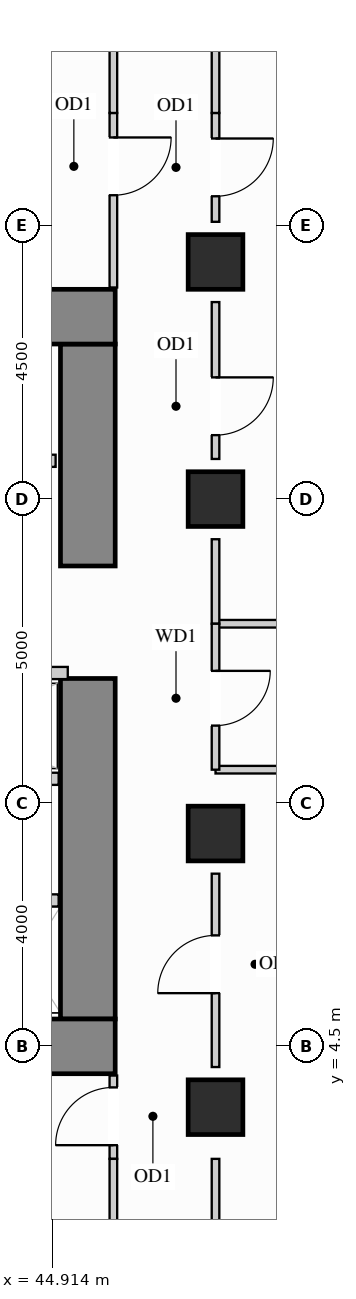
"""IFC4 building model, lengths in metres.
Left out: names, types, materials, properties, quantities, classifications, styles, units other than length and angle.
Written with IfcOpenShell. Run it as: python <this file> out.ifc"""

import sys

from ifc_helpers import new_model, si_unit, direction, frame, frame_2d, origin, origin_2d, place, context, subcontext, project, spatial, rectangle, extrude, source, transform, mapped, element, fill, save


model = new_model("IFC4")
c1 = context("Model", 3, precision=1e-05, world=origin(), true_north=direction((0.0, 1.0)))
c2 = subcontext(c1, "Body", "Model", "MODEL_VIEW")
j1 = project(units=[si_unit("LENGTHUNIT", "METRE"), si_unit("PLANEANGLEUNIT", "RADIAN")], contexts=[c1])
p1 = place(None, origin())
s1 = spatial("IfcSite", under=j1, at=p1, CompositionType="ELEMENT")
p2 = place(p1, origin())
s2 = spatial("IfcBuilding", under=s1, at=p2, CompositionType="ELEMENT")
p3 = place(p2, frame((0.0, 0.0, 69.3)))
s3 = spatial("IfcBuildingStorey", under=s2, at=p3, CompositionType="ELEMENT", Elevation=69.3)
m1 = source(origin(), c2, "Body", "SweptSolid", [
    extrude(rectangle(XDim=0.9, YDim=0.9, at=origin_2d()), origin(), (0.0, 0.0, 1.0), 3.32),
])
for number, where, z_axis, x_axis in (
    (1, (47.6, 13.5, 0.0), (0.0, 0.0, 1.0), (1.0, 0.0, 0.0)),
    (2, (47.6, 3.5, 0.0), (0.0, 0.0, 1.0), (1.0, 0.0, 0.0)),
    (3, (47.6, 8.0, 0.0), (0.0, 0.0, 1.0), (1.0, 0.0, 0.0)),
    (4, (47.6, 17.4, 0.0), (0.0, 0.0, 1.0), (1.0, 0.0, 0.0)),
):
    element("IfcColumn", number, at=place(p3, frame(where, z_axis=z_axis, x_axis=x_axis)), inside=s3, PredefinedType="COLUMN", context=c2, shape_type="MappedRepresentation", body=[
        mapped(m1, transform((0.0, 0.0, 0.0), x_axis=(1.0, 0.0, 0.0), y_axis=(0.0, 1.0, 0.0), z_axis=(0.0, 0.0, 1.0))),
    ])
m2 = source(origin(), c2, "Body", "SweptSolid", [
    extrude(rectangle(XDim=5.6, YDim=0.9, at=frame_2d((2.8, 0.0))), origin(), (0.0, 0.0, 1.0), 3.32),
])
p4 = place(p3, frame((45.5, 4.95, 0.0), z_axis=(0.0, 0.0, 1.0), x_axis=(0.0, 1.0, 0.0)))
e5 = element("IfcWall", 5, at=p4, inside=s3, PredefinedType="SHEAR", context=c2, shape_type="MappedRepresentation", body=[
    mapped(m2, transform((0.0, 0.0, 0.0), x_axis=(1.0, 0.0, 0.0), y_axis=(0.0, 1.0, 0.0), z_axis=(0.0, 0.0, 1.0))),
])
m3 = source(origin(), c2, "Body", "SweptSolid", [
    extrude(rectangle(XDim=3.65, YDim=0.9, at=frame_2d((1.825, 0.0))), origin(), (0.0, 0.0, 1.0), 3.32),
])
p5 = place(p3, frame((45.5, 12.4, 0.0), z_axis=(0.0, 0.0, 1.0), x_axis=(0.0, 1.0, 0.0)))
e6 = element("IfcWall", 6, at=p5, inside=s3, PredefinedType="SHEAR", context=c2, shape_type="MappedRepresentation", body=[
    mapped(m3, transform((0.0, 0.0, 0.0), x_axis=(1.0, 0.0, 0.0), y_axis=(0.0, 1.0, 0.0), z_axis=(0.0, 0.0, 1.0))),
])
m4 = source(origin(), c2, "Body", "SweptSolid", [
    extrude(rectangle(XDim=10.4, YDim=0.9, at=frame_2d((5.2, 0.0))), origin(), (0.0, 0.0, 1.0), 3.32),
])
for number, where, z_axis, x_axis in (
    (7, (35.55, 16.5, 0.0), (0.0, 0.0, 1.0), (1.0, 0.0, 0.0)),
    (8, (35.55, 4.5, 0.0), (0.0, 0.0, 1.0), (1.0, 0.0, 0.0)),
):
    element("IfcWall", number, at=place(p3, frame(where, z_axis=z_axis, x_axis=x_axis)), inside=s3, PredefinedType="SHEAR", context=c2, shape_type="MappedRepresentation", body=[
        mapped(m4, transform((0.0, 0.0, 0.0), x_axis=(1.0, 0.0, 0.0), y_axis=(0.0, 1.0, 0.0), z_axis=(0.0, 0.0, 1.0))),
    ])
m5 = source(origin(), c2, "Body", "SweptSolid", [
    extrude(rectangle(XDim=11.048, YDim=0.125, at=frame_2d((5.524, 0.0))), origin(), (0.0, 0.0, 1.0), 3.305),
])
for number, where, z_axis, x_axis in (
    (9, (47.6, 11.45, 0.0), (0.0, 0.0, 1.0), (1.0, 0.0, 0.0)),
    (10, (47.6, 9.05, 0.0), (0.0, 0.0, 1.0), (1.0, 0.0, 0.0)),
):
    element("IfcWall", number, at=place(p3, frame(where, z_axis=z_axis, x_axis=x_axis)), inside=s3, PredefinedType="PARTITIONING", context=c2, shape_type="MappedRepresentation", body=[
        mapped(m5, transform((0.0, 0.0, 0.0), x_axis=(1.0, 0.0, 0.0), y_axis=(0.0, 1.0, 0.0), z_axis=(0.0, 0.0, 1.0))),
    ])
p6 = place(p3, frame((47.6, 4.16, 0.0), z_axis=(0.0, 0.0, 1.0), x_axis=(0.0, 1.0, 0.0)))
e11 = element("IfcWall", 11, at=p6, inside=s3, PredefinedType="PARTITIONING", context=c2, shape_type="SweptSolid", body=[
    extrude(rectangle(XDim=3.18, YDim=0.125, at=frame_2d((1.59, 0.0))), origin(), (0.0, 0.0, 1.0), 2.61),
])
p7 = place(p6, frame((1.215, 0.0, 0.0)))
e12 = element("IfcOpeningElement", 12, at=p7, cuts=e11, PredefinedType="OPENING", context=c2, shape_type="SweptSolid", body=[
    extrude(rectangle(XDim=0.95, YDim=2.15, at=frame_2d((0.475, 1.075))), frame((0.0, 0.073, 0.0), z_axis=(0.0, -1.0, 0.0), x_axis=(1.0, 0.0, 0.0)), (0.0, 0.0, 1.0), 0.145),
])
m6 = source(origin(), c2, "Body", "SweptSolid", [
    extrude(rectangle(XDim=1.39, YDim=0.125, at=frame_2d((0.695, 0.0))), origin(), (0.0, 0.0, 1.0), 2.61),
])
p8 = place(p3, frame((47.6, 1.26, 0.0), z_axis=(0.0, 0.0, 1.0), x_axis=(0.0, 1.0, 0.0)))
e13 = element("IfcWall", 13, at=p8, inside=s3, PredefinedType="PARTITIONING", context=c2, shape_type="MappedRepresentation", body=[
    mapped(m6, transform((0.0, 0.0, 0.0), x_axis=(1.0, 0.0, 0.0), y_axis=(0.0, 1.0, 0.0), z_axis=(0.0, 0.0, 1.0))),
])
m7 = source(origin(), c2, "Body", "SweptSolid", [
    extrude(rectangle(XDim=1.39, YDim=0.125, at=frame_2d((0.695, 0.0))), origin(), (0.0, 0.0, 1.0), 2.61),
])
p9 = place(p3, frame((47.6, 11.45, 0.0), z_axis=(0.0, 0.0, 1.0), x_axis=(0.0, 1.0, 0.0)))
e14 = element("IfcWall", 14, at=p9, inside=s3, PredefinedType="PARTITIONING", context=c2, shape_type="MappedRepresentation", body=[
    mapped(m7, transform((0.0, 0.0, 0.0), x_axis=(1.0, 0.0, 0.0), y_axis=(0.0, 1.0, 0.0), z_axis=(0.0, 0.0, 1.0))),
])
p10 = place(p3, frame((47.6, 14.16, 0.0), z_axis=(0.0, 0.0, 1.0), x_axis=(0.0, 1.0, 0.0)))
e15 = element("IfcWall", 15, at=p10, inside=s3, PredefinedType="PARTITIONING", context=c2, shape_type="SweptSolid", body=[
    extrude(rectangle(XDim=2.58, YDim=0.125, at=frame_2d((1.29, 0.0))), origin(), (0.0, 0.0, 1.0), 2.61),
])
p11 = place(p10, frame((0.392, 0.0, 0.0)))
e16 = element("IfcOpeningElement", 16, at=p11, cuts=e15, PredefinedType="OPENING", context=c2, shape_type="SweptSolid", body=[
    extrude(rectangle(XDim=0.95, YDim=2.15, at=frame_2d((0.475, 1.075))), frame((0.0, 0.073, 0.0), z_axis=(0.0, -1.0, 0.0), x_axis=(1.0, 0.0, 0.0)), (0.0, 0.0, 1.0), 0.145),
])
p12 = place(p3, frame((47.6, 18.06, 0.0), z_axis=(0.0, 0.0, 1.0), x_axis=(0.0, 1.0, 0.0)))
e17 = element("IfcWall", 17, at=p12, inside=s3, PredefinedType="PARTITIONING", context=c2, shape_type="SweptSolid", body=[
    extrude(rectangle(XDim=1.79, YDim=0.125, at=frame_2d((0.895, 0.0))), origin(), (0.0, 0.0, 1.0), 2.61),
])
p13 = place(p12, frame((0.42, 0.0, 0.0)))
e18 = element("IfcOpeningElement", 18, at=p13, cuts=e17, PredefinedType="OPENING", context=c2, shape_type="SweptSolid", body=[
    extrude(rectangle(XDim=0.95, YDim=2.15, at=frame_2d((0.475, 1.075))), frame((0.0, 0.073, 0.0), z_axis=(0.0, -1.0, 0.0), x_axis=(1.0, 0.0, 0.0)), (0.0, 0.0, 1.0), 0.145),
])
p14 = place(p3, frame((47.6, 19.85, 0.0), z_axis=(0.0, 0.0, 1.0), x_axis=(0.0, 1.0, 0.0)))
e19 = element("IfcWall", 19, at=p14, inside=s3, PredefinedType="PARTITIONING", context=c2, shape_type="MappedRepresentation", body=[
    mapped(m6, transform((0.0, 0.0, 0.0), x_axis=(1.0, 0.0, 0.0), y_axis=(0.0, 1.0, 0.0), z_axis=(0.0, 0.0, 1.0))),
])
p15 = place(p3, frame((47.6, 9.05, 0.0), z_axis=(0.0, 0.0, 1.0), x_axis=(0.0, 1.0, 0.0)))
e20 = element("IfcWall", 20, at=p15, inside=s3, PredefinedType="PARTITIONING", context=c2, shape_type="SweptSolid", body=[
    extrude(rectangle(XDim=2.4, YDim=0.125, at=frame_2d((1.2, 0.0))), origin(), (0.0, 0.0, 1.0), 2.61),
])
p16 = place(p15, frame((0.725, 0.0, 0.0)))
e21 = element("IfcOpeningElement", 21, at=p16, cuts=e20, PredefinedType="OPENING", context=c2, shape_type="SweptSolid", body=[
    extrude(rectangle(XDim=0.9, YDim=2.15, at=frame_2d((0.45, 1.075))), frame((0.0, 0.073, 0.0), z_axis=(0.0, -1.0, 0.0), x_axis=(1.0, 0.0, 0.0)), (0.0, 0.0, 1.0), 0.145),
])
p17 = place(p3, frame((45.92, 16.98, 0.0), z_axis=(0.0, 0.0, 1.0), x_axis=(0.0, 1.0, 0.0)))
e22 = element("IfcWall", 22, at=p17, inside=s3, PredefinedType="PARTITIONING", context=c2, shape_type="SweptSolid", body=[
    extrude(rectangle(XDim=2.87, YDim=0.125, at=frame_2d((1.435, 0.0))), origin(), (0.0, 0.0, 1.0), 3.305),
])
p18 = place(p17, frame((1.517, 0.0, 0.0)))
e23 = element("IfcOpeningElement", 23, at=p18, cuts=e22, PredefinedType="OPENING", context=c2, shape_type="SweptSolid", body=[
    extrude(rectangle(XDim=0.95, YDim=2.15, at=frame_2d((0.475, 1.075))), frame((0.0, 0.073, 0.0), z_axis=(0.0, -1.0, 0.0), x_axis=(1.0, 0.0, 0.0)), (0.0, 0.0, 1.0), 0.145),
])
m8 = source(origin(), c2, "Body", "SweptSolid", [
    extrude(rectangle(XDim=2.298, YDim=0.125, at=frame_2d((1.149, 0.0))), origin(), (0.0, 0.0, 1.0), 3.305),
])
p19 = place(p3, frame((45.92, 19.85, 0.0), z_axis=(0.0, 0.0, 1.0), x_axis=(0.0, 1.0, 0.0)))
e24 = element("IfcWall", 24, at=p19, inside=s3, PredefinedType="PARTITIONING", context=c2, shape_type="MappedRepresentation", body=[
    mapped(m8, transform((0.0, 0.0, 0.0), x_axis=(1.0, 0.0, 0.0), y_axis=(0.0, 1.0, 0.0), z_axis=(0.0, 0.0, 1.0))),
])
p20 = place(p3, frame((45.92, 2.65, 0.0), z_axis=(0.0, 0.0, 1.0), x_axis=(0.0, 1.0, 0.0)))
e25 = element("IfcWall", 25, at=p20, inside=s3, PredefinedType="PARTITIONING", context=c2, shape_type="SweptSolid", body=[
    extrude(rectangle(XDim=1.37, YDim=0.125, at=frame_2d((0.685, 0.0))), origin(), (0.0, 0.0, 1.0), 3.305),
])
p21 = place(p20, frame((0.225, 0.0, 0.0)))
e26 = element("IfcOpeningElement", 26, at=p21, cuts=e25, PredefinedType="OPENING", context=c2, shape_type="SweptSolid", body=[
    extrude(rectangle(XDim=0.95, YDim=2.15, at=frame_2d((0.475, 1.075))), frame((0.0, 0.073, 0.0), z_axis=(0.0, -1.0, 0.0), x_axis=(1.0, 0.0, 0.0)), (0.0, 0.0, 1.0), 0.145),
])
p22 = place(p3, frame((45.92, 0.352, 0.0), z_axis=(0.0, 0.0, 1.0), x_axis=(0.0, 1.0, 0.0)))
e27 = element("IfcWall", 27, at=p22, inside=s3, PredefinedType="PARTITIONING", context=c2, shape_type="MappedRepresentation", body=[
    mapped(m8, transform((0.0, 0.0, 0.0), x_axis=(1.0, 0.0, 0.0), y_axis=(0.0, 1.0, 0.0), z_axis=(0.0, 0.0, 1.0))),
])
m9 = source(origin(), c2, "Body", "SweptSolid", [
    extrude(rectangle(XDim=1.17, YDim=0.2, at=frame_2d((0.585, 0.0))), origin(), (0.0, 0.0, 1.0), 3.305),
])
p23 = place(p3, frame((43.85, 6.9, 0.0), z_axis=(0.0, 0.0, 1.0), x_axis=(1.0, 0.0, 0.0)))
e28 = element("IfcWall", 28, at=p23, inside=s3, PredefinedType="PARTITIONING", context=c2, shape_type="MappedRepresentation", body=[
    mapped(m9, transform((0.0, 0.0, 0.0), x_axis=(1.0, 0.0, 0.0), y_axis=(0.0, 1.0, 0.0), z_axis=(0.0, 0.0, 1.0))),
])
p24 = place(p3, frame((42.23, 14.13, 0.0), z_axis=(0.0, 0.0, 1.0), x_axis=(1.0, 0.0, 0.0)))
e29 = element("IfcWall", 29, at=p24, inside=s3, PredefinedType="PARTITIONING", context=c2, shape_type="SweptSolid", body=[
    extrude(rectangle(XDim=2.74, YDim=0.2, at=frame_2d((1.37, 0.0))), origin(), (0.0, 0.0, 1.0), 3.305),
])
p25 = place(p24, frame((0.82, 0.0, 0.0)))
e30 = element("IfcOpeningElement", 30, at=p25, cuts=e29, PredefinedType="OPENING", context=c2, shape_type="SweptSolid", body=[
    extrude(rectangle(XDim=1.1, YDim=2.2, at=frame_2d((0.55, 1.1))), frame((0.0, 0.11, 0.0), z_axis=(0.0, -1.0, 0.0), x_axis=(1.0, 0.0, 0.0)), (0.0, 0.0, 1.0), 0.22),
])
m10 = source(origin(), c2, "Body", "SweptSolid", [
    extrude(rectangle(XDim=3.49, YDim=0.2, at=frame_2d((1.745, 0.0))), origin(), (0.0, 0.0, 1.0), 3.305),
])
p26 = place(p3, frame((41.68, 10.64, 0.0), z_axis=(0.0, 0.0, 1.0), x_axis=(1.0, 0.0, 0.0)))
e31 = element("IfcWall", 31, at=p26, inside=s3, PredefinedType="PARTITIONING", context=c2, shape_type="MappedRepresentation", body=[
    mapped(m10, transform((0.0, 0.0, 0.0), x_axis=(1.0, 0.0, 0.0), y_axis=(0.0, 1.0, 0.0), z_axis=(0.0, 0.0, 1.0))),
])
m11 = source(origin(), c2, "Body", "SweptSolid", [
    extrude(rectangle(XDim=3.34, YDim=0.2, at=frame_2d((1.67, 0.0))), origin(), (0.0, 0.0, 1.0), 3.305),
])
p27 = place(p3, frame((41.68, 8.9, 0.0), z_axis=(0.0, 0.0, 1.0), x_axis=(1.0, 0.0, 0.0)))
e32 = element("IfcWall", 32, at=p27, inside=s3, PredefinedType="PARTITIONING", context=c2, shape_type="MappedRepresentation", body=[
    mapped(m11, transform((0.0, 0.0, 0.0), x_axis=(1.0, 0.0, 0.0), y_axis=(0.0, 1.0, 0.0), z_axis=(0.0, 0.0, 1.0))),
])
m12 = source(origin(), c2, "Body", "SweptSolid", [
    extrude(rectangle(XDim=0.95, YDim=2.15, at=frame_2d((0.475, 1.075))), frame((0.0, 0.025, 0.0), z_axis=(0.0, -1.0, 0.0), x_axis=(1.0, 0.0, 0.0)), (0.0, 0.0, 1.0), 0.05),
])
p28 = place(p18, origin())
e33 = element("IfcDoor", 33, at=p28, inside=s3, OperationType="SINGLE_SWING_RIGHT", PredefinedType="DOOR", context=c2, shape_type="MappedRepresentation", body=[
    mapped(m12, transform((0.0, 0.0, 0.0), x_axis=(1.0, 0.0, 0.0), y_axis=(0.0, 1.0, 0.0), z_axis=(0.0, 0.0, 1.0))),
])
fill(e23, e33)
p29 = place(p21, origin())
e34 = element("IfcDoor", 34, at=p29, inside=s3, OperationType="SINGLE_SWING_LEFT", PredefinedType="DOOR", context=c2, shape_type="MappedRepresentation", body=[
    mapped(m12, transform((0.0, 0.0, 0.0), x_axis=(1.0, 0.0, 0.0), y_axis=(0.0, 1.0, 0.0), z_axis=(0.0, 0.0, 1.0))),
])
fill(e26, e34)
p30 = place(p7, origin())
e35 = element("IfcDoor", 35, at=p30, inside=s3, OperationType="SINGLE_SWING_LEFT", PredefinedType="DOOR", context=c2, shape_type="MappedRepresentation", body=[
    mapped(m12, transform((0.0, 0.0, 0.0), x_axis=(1.0, 0.0, 0.0), y_axis=(0.0, 1.0, 0.0), z_axis=(0.0, 0.0, 1.0))),
])
fill(e12, e35)
p31 = place(p11, origin())
e36 = element("IfcDoor", 36, at=p31, inside=s3, OperationType="SINGLE_SWING_RIGHT", PredefinedType="DOOR", context=c2, shape_type="MappedRepresentation", body=[
    mapped(m12, transform((0.0, 0.0, 0.0), x_axis=(1.0, 0.0, 0.0), y_axis=(0.0, 1.0, 0.0), z_axis=(0.0, 0.0, 1.0))),
])
fill(e16, e36)
p32 = place(p13, origin())
e37 = element("IfcDoor", 37, at=p32, inside=s3, OperationType="SINGLE_SWING_RIGHT", PredefinedType="DOOR", context=c2, shape_type="MappedRepresentation", body=[
    mapped(m12, transform((0.0, 0.0, 0.0), x_axis=(1.0, 0.0, 0.0), y_axis=(0.0, 1.0, 0.0), z_axis=(0.0, 0.0, 1.0))),
])
fill(e18, e37)
m13 = source(origin(), c2, "Body", "SweptSolid", [
    extrude(rectangle(XDim=0.9, YDim=2.15, at=frame_2d((0.45, 1.075))), frame((0.0, 0.025, 0.0), z_axis=(0.0, -1.0, 0.0), x_axis=(1.0, 0.0, 0.0)), (0.0, 0.0, 1.0), 0.05),
])
p33 = place(p16, origin())
e38 = element("IfcDoor", 38, at=p33, inside=s3, OperationType="SINGLE_SWING_RIGHT", PredefinedType="DOOR", context=c2, shape_type="MappedRepresentation", body=[
    mapped(m13, transform((0.0, 0.0, 0.0), x_axis=(1.0, 0.0, 0.0), y_axis=(0.0, 1.0, 0.0), z_axis=(0.0, 0.0, 1.0))),
])
fill(e21, e38)
save(model, sys.argv[1])
